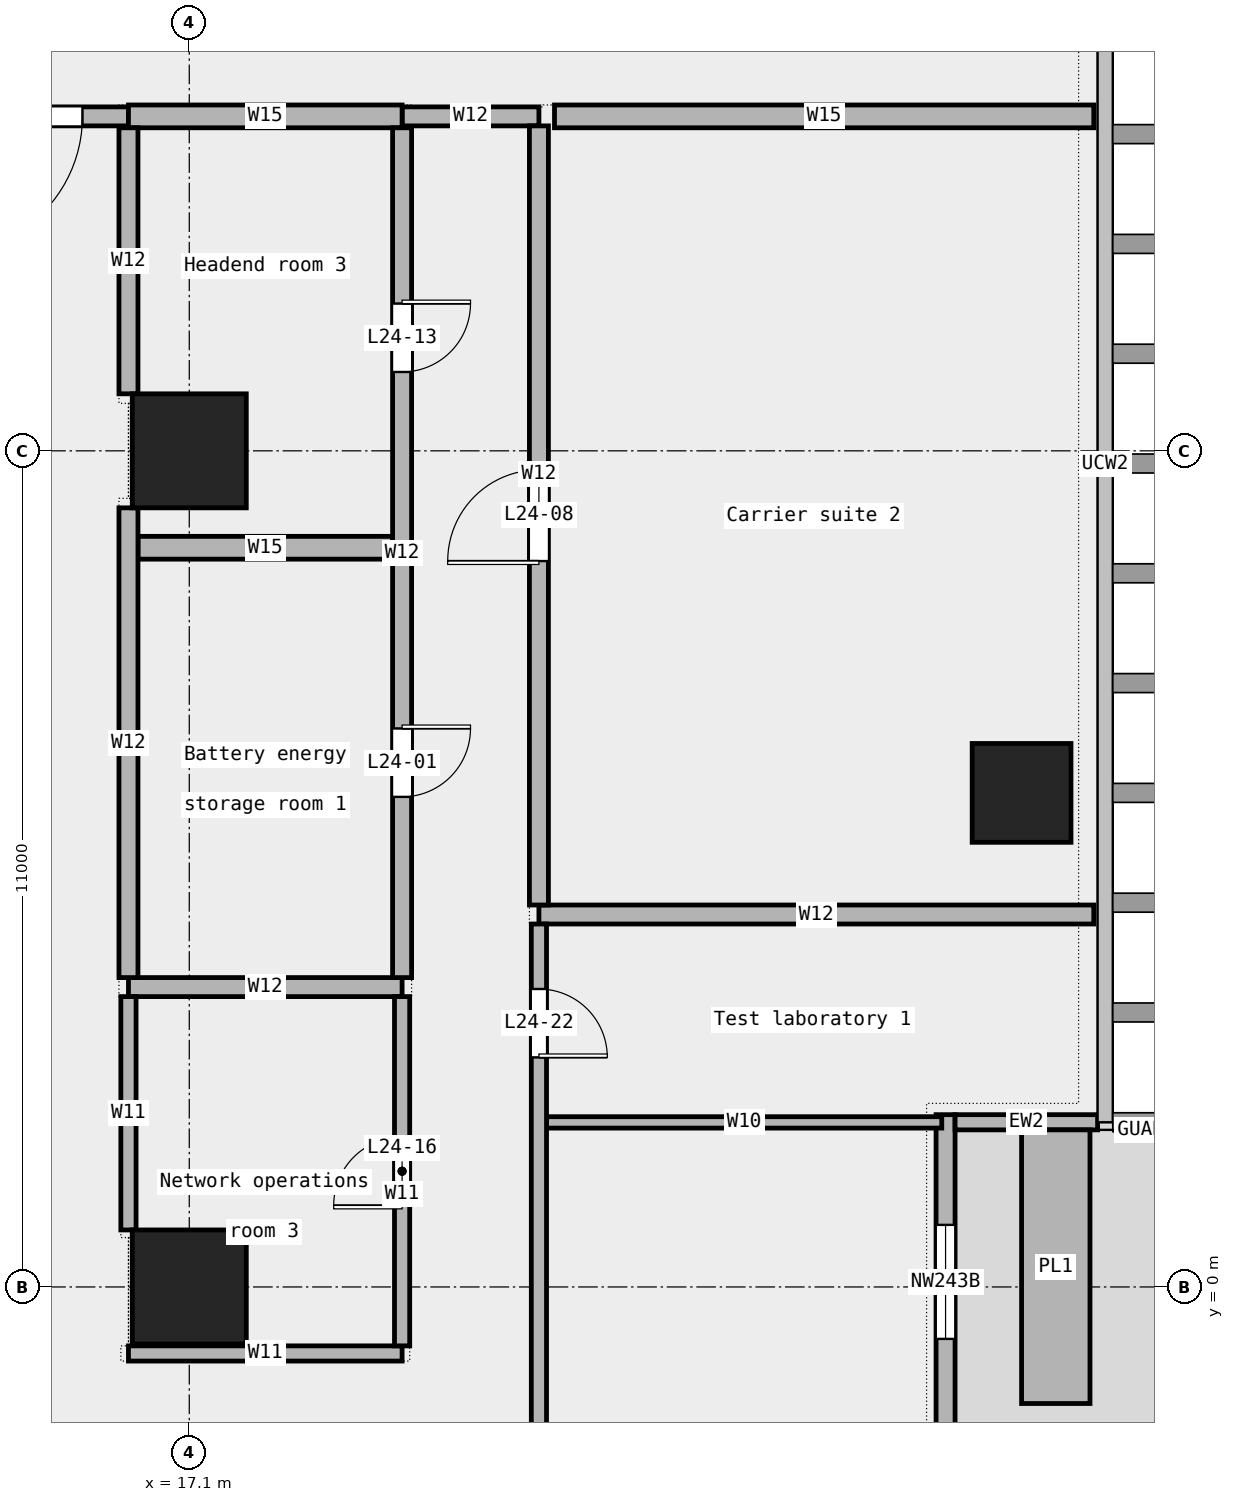
"""IFC4 building model, lengths in metres.
Left out: names, types, materials, properties, quantities, classifications, styles, units other than length and angle.
Written with IfcOpenShell. Run it as: python <this file> out.ifc"""

import sys

from ifc_helpers import new_model, si_unit, direction, frame, frame_2d, origin, origin_2d, place, context, subcontext, project, spatial, rectangle, extrude, element, fill, save


model = new_model("IFC4")
c1 = context("Model", 3, precision=1e-05, world=origin(), true_north=direction((0.0, 1.0)))
c2 = subcontext(c1, "Body", "Model", "MODEL_VIEW")
j1 = project(units=[si_unit("LENGTHUNIT", "METRE"), si_unit("PLANEANGLEUNIT", "RADIAN")], contexts=[c1])
p1 = place(None, origin())
s1 = spatial("IfcSite", under=j1, at=p1, CompositionType="ELEMENT")
p2 = place(p1, origin())
s2 = spatial("IfcBuilding", under=s1, at=p2, CompositionType="ELEMENT")
p3 = place(p2, frame((0.0, 0.0, 121.6)))
s3 = spatial("IfcBuildingStorey", under=s2, at=p3, CompositionType="ELEMENT", Elevation=121.6)
p4 = place(p3, frame((28.05, 6.5, 0.0), z_axis=(0.0, 0.0, 1.0), x_axis=(1.0, 0.0, 0.0)))
e1 = element("IfcColumn", 1, at=p4, inside=s3, PredefinedType="COLUMN", context=c2, shape_type="SweptSolid", body=[
    extrude(rectangle(XDim=1.3, YDim=1.3, at=origin_2d()), origin(), (0.0, 0.0, 1.0), 4.05),
])
for number, where, z_axis, x_axis in (
    (2, (17.1, 0.0, 0.0), (0.0, 0.0, 1.0), (1.0, 0.0, 0.0)),
    (3, (17.1, 11.0, 0.0), (0.0, 0.0, 1.0), (1.0, 0.0, 0.0)),
):
    element("IfcColumn", number, at=place(p3, frame(where, z_axis=z_axis, x_axis=x_axis)), inside=s3, PredefinedType="COLUMN", context=c2, shape_type="SweptSolid", body=[
        extrude(rectangle(XDim=1.5, YDim=1.5, at=origin_2d()), origin(), (0.0, 0.0, 1.0), 4.05),
    ])
p5 = place(p3, frame((27.05, -10.933, 0.0), z_axis=(0.0, 0.0, 1.0), x_axis=(0.0, 1.0, 0.0)))
e4 = element("IfcWall", 4, at=p5, inside=s3, PredefinedType="STANDARD", context=c2, shape_type="SweptSolid", body=[
    extrude(rectangle(XDim=13.2, YDim=0.25, at=frame_2d((6.6, 0.0))), origin(), (0.0, 0.0, 1.0), 4.05),
])
p6 = place(p5, frame((1.5, 0.0, 0.45)))
e5 = element("IfcOpeningElement", 5, at=p6, cuts=e4, PredefinedType="OPENING", context=c2, shape_type="SweptSolid", body=[
    extrude(rectangle(XDim=1.5, YDim=3.0, at=frame_2d((0.75, 1.5))), frame((0.0, 0.137, 0.0), z_axis=(0.0, -1.0, 0.0), x_axis=(1.0, 0.0, 0.0)), (0.0, 0.0, 1.0), 0.274),
])
p7 = place(p5, frame((5.75, 0.0, 0.0)))
e6 = element("IfcOpeningElement", 6, at=p7, cuts=e4, PredefinedType="OPENING", context=c2, shape_type="SweptSolid", body=[
    extrude(rectangle(XDim=1.8, YDim=2.4, at=frame_2d((0.9, 1.2))), frame((0.0, 0.137, 0.0), z_axis=(0.0, -1.0, 0.0), x_axis=(1.0, 0.0, 0.0)), (0.0, 0.0, 1.0), 0.274),
])
p8 = place(p5, frame((10.25, 0.0, 0.45)))
e7 = element("IfcOpeningElement", 7, at=p8, cuts=e4, PredefinedType="OPENING", context=c2, shape_type="SweptSolid", body=[
    extrude(rectangle(XDim=1.5, YDim=3.0, at=frame_2d((0.75, 1.5))), frame((0.0, 0.137, 0.0), z_axis=(0.0, -1.0, 0.0), x_axis=(1.0, 0.0, 0.0)), (0.0, 0.0, 1.0), 0.274),
])
p9 = place(p3, frame((29.05, 2.167, 0.0), z_axis=(0.0, 0.0, 1.0), x_axis=(-1.0, 0.0, 0.0)))
e8 = element("IfcWall", 8, at=p9, inside=s3, PredefinedType="STANDARD", context=c2, shape_type="SweptSolid", body=[
    extrude(rectangle(XDim=1.875, YDim=0.2, at=frame_2d((0.938, 0.0))), origin(), (0.0, 0.0, 1.0), 4.05),
])
p10 = place(p3, frame((28.5, -1.533, 0.0), z_axis=(0.0, 0.0, 1.0), x_axis=(0.0, 1.0, 0.0)))
e9 = element("IfcWall", 9, at=p10, inside=s3, PredefinedType="STANDARD", context=c2, shape_type="SweptSolid", body=[
    extrude(rectangle(XDim=3.6, YDim=0.9, at=frame_2d((1.8, 0.0))), origin(), (0.0, 0.0, 1.0), 0.7),
])
p11 = place(p3, frame((16.3, -0.875, 0.0), z_axis=(0.0, 0.0, 1.0), x_axis=(1.0, 0.0, 0.0)))
e10 = element("IfcWall", 10, at=p11, inside=s3, PredefinedType="PARTITIONING", context=c2, shape_type="SweptSolid", body=[
    extrude(rectangle(XDim=3.6, YDim=0.2, at=frame_2d((1.8, 0.0))), origin(), (0.0, 0.0, 1.0), 4.05),
])
p12 = place(p3, frame((21.8, 2.165, 0.0), z_axis=(0.0, 0.0, 1.0), x_axis=(1.0, 0.0, 0.0)))
e11 = element("IfcWall", 11, at=p12, inside=s3, PredefinedType="PARTITIONING", context=c2, shape_type="SweptSolid", body=[
    extrude(rectangle(XDim=5.2, YDim=0.15, at=frame_2d((2.6, 0.0))), origin(), (0.0, 0.0, 1.0), 4.05),
])
p13 = place(p3, frame((16.3, 3.945, 0.0), z_axis=(0.0, 0.0, 1.0), x_axis=(1.0, 0.0, 0.0)))
e12 = element("IfcWall", 12, at=p13, inside=s3, PredefinedType="PARTITIONING", context=c2, shape_type="SweptSolid", body=[
    extrude(rectangle(XDim=3.6, YDim=0.25, at=frame_2d((1.8, 0.0))), origin(), (0.0, 0.0, 1.0), 4.05),
])
p14 = place(p3, frame((21.7, 4.9, 0.0), z_axis=(0.0, 0.0, 1.0), x_axis=(1.0, 0.0, 0.0)))
e13 = element("IfcWall", 13, at=p14, inside=s3, PredefinedType="PARTITIONING", context=c2, shape_type="SweptSolid", body=[
    extrude(rectangle(XDim=7.3, YDim=0.25, at=frame_2d((3.65, 0.0))), origin(), (0.0, 0.0, 1.0), 4.05),
])
p15 = place(p3, frame((16.425, 9.725, 0.0), z_axis=(0.0, 0.0, 1.0), x_axis=(1.0, 0.0, 0.0)))
e14 = element("IfcWall", 14, at=p15, inside=s3, PredefinedType="PARTITIONING", context=c2, shape_type="SweptSolid", body=[
    extrude(rectangle(XDim=3.35, YDim=0.3, at=frame_2d((1.675, 0.0))), origin(), (0.0, 0.0, 1.0), 4.05),
])
p16 = place(p3, frame((13.29, 15.4, 0.0), z_axis=(0.0, 0.0, 1.0), x_axis=(1.0, 0.0, 0.0)))
e15 = element("IfcWall", 15, at=p16, inside=s3, PredefinedType="PARTITIONING", context=c2, shape_type="SweptSolid", body=[
    extrude(rectangle(XDim=3.01, YDim=0.25, at=frame_2d((1.505, 0.0))), origin(), (0.0, 0.0, 1.0), 4.05),
])
p17 = place(p16, frame((0.605, 0.0, 0.0)))
e16 = element("IfcOpeningElement", 16, at=p17, cuts=e15, PredefinedType="OPENING", context=c2, shape_type="SweptSolid", body=[
    extrude(rectangle(XDim=1.8, YDim=2.1, at=frame_2d((0.9, 1.05))), frame((0.0, 0.137, 0.0), z_axis=(0.0, -1.0, 0.0), x_axis=(1.0, 0.0, 0.0)), (0.0, 0.0, 1.0), 0.274),
])
p18 = place(p3, frame((19.9, 15.4, 0.0), z_axis=(0.0, 0.0, 1.0), x_axis=(1.0, 0.0, 0.0)))
e17 = element("IfcWall", 17, at=p18, inside=s3, PredefinedType="PARTITIONING", context=c2, shape_type="SweptSolid", body=[
    extrude(rectangle(XDim=1.8, YDim=0.25, at=frame_2d((0.9, 0.0))), origin(), (0.0, 0.0, 1.0), 4.05),
])
p19 = place(p3, frame((16.3, 15.4, 0.0), z_axis=(0.0, 0.0, 1.0), x_axis=(1.0, 0.0, 0.0)))
e18 = element("IfcWall", 18, at=p19, inside=s3, PredefinedType="PARTITIONING", context=c2, shape_type="SweptSolid", body=[
    extrude(rectangle(XDim=3.6, YDim=0.3, at=frame_2d((1.8, 0.0))), origin(), (0.0, 0.0, 1.0), 4.05),
])
p20 = place(p3, frame((21.905, 15.4, 0.0), z_axis=(0.0, 0.0, 1.0), x_axis=(1.0, 0.0, 0.0)))
e19 = element("IfcWall", 19, at=p20, inside=s3, PredefinedType="PARTITIONING", context=c2, shape_type="SweptSolid", body=[
    extrude(rectangle(XDim=7.095, YDim=0.3, at=frame_2d((3.547, 0.0))), origin(), (0.0, 0.0, 1.0), 4.05),
])
p21 = place(p3, frame((16.3, 0.75, 0.0), z_axis=(0.0, 0.0, 1.0), x_axis=(0.0, 1.0, 0.0)))
e20 = element("IfcWall", 20, at=p21, inside=s3, PredefinedType="PARTITIONING", context=c2, shape_type="SweptSolid", body=[
    extrude(rectangle(XDim=3.07, YDim=0.2, at=frame_2d((1.535, 0.0))), origin(), (0.0, 0.0, 1.0), 4.05),
])
p22 = place(p3, frame((16.3, 4.07, 0.0), z_axis=(0.0, 0.0, 1.0), x_axis=(0.0, 1.0, 0.0)))
e21 = element("IfcWall", 21, at=p22, inside=s3, PredefinedType="PARTITIONING", context=c2, shape_type="SweptSolid", body=[
    extrude(rectangle(XDim=6.18, YDim=0.25, at=frame_2d((3.09, 0.0))), origin(), (0.0, 0.0, 1.0), 4.05),
])
p23 = place(p3, frame((16.3, 11.75, 0.0), z_axis=(0.0, 0.0, 1.0), x_axis=(0.0, 1.0, 0.0)))
e22 = element("IfcWall", 22, at=p23, inside=s3, PredefinedType="PARTITIONING", context=c2, shape_type="SweptSolid", body=[
    extrude(rectangle(XDim=3.5, YDim=0.25, at=frame_2d((1.75, 0.0))), origin(), (0.0, 0.0, 1.0), 4.05),
])
p24 = place(p3, frame((19.9, -0.775, 0.0), z_axis=(0.0, 0.0, 1.0), x_axis=(0.0, 1.0, 0.0)))
e23 = element("IfcWall", 23, at=p24, inside=s3, PredefinedType="PARTITIONING", context=c2, shape_type="SweptSolid", body=[
    extrude(rectangle(XDim=4.595, YDim=0.2, at=frame_2d((2.297, 0.0))), origin(), (0.0, 0.0, 1.0), 4.05),
])
p25 = place(p24, frame((1.847, 0.0, 0.0)))
e24 = element("IfcOpeningElement", 24, at=p25, cuts=e23, PredefinedType="OPENING", context=c2, shape_type="SweptSolid", body=[
    extrude(rectangle(XDim=0.9, YDim=2.1, at=frame_2d((0.45, 1.05))), frame((0.0, 0.112, 0.0), z_axis=(0.0, -1.0, 0.0), x_axis=(1.0, 0.0, 0.0)), (0.0, 0.0, 1.0), 0.224),
])
p26 = place(p3, frame((19.9, 4.07, 0.0), z_axis=(0.0, 0.0, 1.0), x_axis=(0.0, 1.0, 0.0)))
e25 = element("IfcWall", 25, at=p26, inside=s3, PredefinedType="PARTITIONING", context=c2, shape_type="SweptSolid", body=[
    extrude(rectangle(XDim=11.18, YDim=0.25, at=frame_2d((5.59, 0.0))), origin(), (0.0, 0.0, 1.0), 4.05),
])
p27 = place(p26, frame((2.377, 0.0, 0.0)))
e26 = element("IfcOpeningElement", 26, at=p27, cuts=e25, PredefinedType="OPENING", context=c2, shape_type="SweptSolid", body=[
    extrude(rectangle(XDim=0.9, YDim=2.1, at=frame_2d((0.45, 1.05))), frame((0.0, 0.137, 0.0), z_axis=(0.0, -1.0, 0.0), x_axis=(1.0, 0.0, 0.0)), (0.0, 0.0, 1.0), 0.274),
])
p28 = place(p26, frame((7.968, 0.0, 0.0)))
e27 = element("IfcOpeningElement", 27, at=p28, cuts=e25, PredefinedType="OPENING", context=c2, shape_type="SweptSolid", body=[
    extrude(rectangle(XDim=0.9, YDim=2.1, at=frame_2d((0.45, 1.05))), frame((0.0, 0.137, 0.0), z_axis=(0.0, -1.0, 0.0), x_axis=(1.0, 0.0, 0.0)), (0.0, 0.0, 1.0), 0.274),
])
p29 = place(p3, frame((21.7, -9.0, 0.0), z_axis=(0.0, 0.0, 1.0), x_axis=(0.0, 1.0, 0.0)))
e28 = element("IfcWall", 28, at=p29, inside=s3, PredefinedType="PARTITIONING", context=c2, shape_type="SweptSolid", body=[
    extrude(rectangle(XDim=13.775, YDim=0.2, at=frame_2d((6.887, 0.0))), origin(), (0.0, 0.0, 1.0), 4.05),
])
p30 = place(p29, frame((4.833, 0.0, 0.0)))
e29 = element("IfcOpeningElement", 29, at=p30, cuts=e28, PredefinedType="OPENING", context=c2, shape_type="SweptSolid", body=[
    extrude(rectangle(XDim=1.5, YDim=2.1, at=frame_2d((0.75, 1.05))), frame((0.0, 0.112, 0.0), z_axis=(0.0, -1.0, 0.0), x_axis=(1.0, 0.0, 0.0)), (0.0, 0.0, 1.0), 0.224),
])
p31 = place(p29, frame((12.02, 0.0, 0.0)))
e30 = element("IfcOpeningElement", 30, at=p31, cuts=e28, PredefinedType="OPENING", context=c2, shape_type="SweptSolid", body=[
    extrude(rectangle(XDim=0.9, YDim=2.1, at=frame_2d((0.45, 1.05))), frame((0.0, 0.112, 0.0), z_axis=(0.0, -1.0, 0.0), x_axis=(1.0, 0.0, 0.0)), (0.0, 0.0, 1.0), 0.224),
])
p32 = place(p3, frame((21.7, 5.025, 0.0), z_axis=(0.0, 0.0, 1.0), x_axis=(0.0, 1.0, 0.0)))
e31 = element("IfcWall", 31, at=p32, inside=s3, PredefinedType="PARTITIONING", context=c2, shape_type="SweptSolid", body=[
    extrude(rectangle(XDim=10.25, YDim=0.25, at=frame_2d((5.125, 0.0))), origin(), (0.0, 0.0, 1.0), 4.05),
])
p33 = place(p32, frame((4.525, 0.0, 0.0)))
e32 = element("IfcOpeningElement", 32, at=p33, cuts=e31, PredefinedType="OPENING", context=c2, shape_type="SweptSolid", body=[
    extrude(rectangle(XDim=1.2, YDim=2.1, at=frame_2d((0.6, 1.05))), frame((0.0, 0.137, 0.0), z_axis=(0.0, -1.0, 0.0), x_axis=(1.0, 0.0, 0.0)), (0.0, 0.0, 1.0), 0.274),
])
p34 = place(p8, origin())
e33 = element("IfcWindow", 33, at=p34, inside=s3, PartitioningType="SINGLE_PANEL", PredefinedType="WINDOW", context=c2, shape_type="SweptSolid", body=[
    extrude(rectangle(XDim=1.5, YDim=3.0, at=frame_2d((0.75, 1.5))), frame((0.0, 0.03, 0.0), z_axis=(0.0, -1.0, 0.0), x_axis=(1.0, 0.0, 0.0)), (0.0, 0.0, 1.0), 0.06),
])
fill(e7, e33)
p35 = place(p27, origin())
e34 = element("IfcDoor", 34, at=p35, inside=s3, OperationType="SINGLE_SWING_LEFT", PredefinedType="DOOR", context=c2, shape_type="SweptSolid", body=[
    extrude(rectangle(XDim=0.9, YDim=2.1, at=frame_2d((0.45, 1.05))), frame((0.0, 0.025, 0.0), z_axis=(0.0, -1.0, 0.0), x_axis=(1.0, 0.0, 0.0)), (0.0, 0.0, 1.0), 0.05),
])
fill(e26, e34)
p36 = place(p33, origin())
e35 = element("IfcDoor", 35, at=p36, inside=s3, OperationType="SINGLE_SWING_LEFT", PredefinedType="DOOR", context=c2, shape_type="SweptSolid", body=[
    extrude(rectangle(XDim=1.2, YDim=2.1, at=frame_2d((0.6, 1.05))), frame((0.0, 0.025, 0.0), z_axis=(0.0, -1.0, 0.0), x_axis=(1.0, 0.0, 0.0)), (0.0, 0.0, 1.0), 0.05),
])
fill(e32, e35)
p37 = place(p28, origin())
e36 = element("IfcDoor", 36, at=p37, inside=s3, OperationType="SINGLE_SWING_LEFT", PredefinedType="DOOR", context=c2, shape_type="SweptSolid", body=[
    extrude(rectangle(XDim=0.9, YDim=2.1, at=frame_2d((0.45, 1.05))), frame((0.0, 0.025, 0.0), z_axis=(0.0, -1.0, 0.0), x_axis=(1.0, 0.0, 0.0)), (0.0, 0.0, 1.0), 0.05),
])
fill(e27, e36)
p38 = place(p25, origin())
e37 = element("IfcDoor", 37, at=p38, inside=s3, OperationType="SINGLE_SWING_LEFT", PredefinedType="DOOR", context=c2, shape_type="SweptSolid", body=[
    extrude(rectangle(XDim=0.9, YDim=2.1, at=frame_2d((0.45, 1.05))), frame((0.0, 0.025, 0.0), z_axis=(0.0, -1.0, 0.0), x_axis=(1.0, 0.0, 0.0)), (0.0, 0.0, 1.0), 0.05),
])
fill(e24, e37)
p39 = place(p17, origin())
e38 = element("IfcDoor", 38, at=p39, inside=s3, OperationType="DOUBLE_DOOR_SINGLE_SWING", PredefinedType="DOOR", context=c2, shape_type="SweptSolid", body=[
    extrude(rectangle(XDim=1.8, YDim=2.1, at=frame_2d((0.9, 1.05))), frame((0.0, 0.025, 0.0), z_axis=(0.0, -1.0, 0.0), x_axis=(1.0, 0.0, 0.0)), (0.0, 0.0, 1.0), 0.05),
])
fill(e16, e38)
p40 = place(p31, origin())
e39 = element("IfcDoor", 39, at=p40, inside=s3, OperationType="SINGLE_SWING_RIGHT", PredefinedType="DOOR", context=c2, shape_type="SweptSolid", body=[
    extrude(rectangle(XDim=0.9, YDim=2.1, at=frame_2d((0.45, 1.05))), frame((0.0, 0.025, 0.0), z_axis=(0.0, -1.0, 0.0), x_axis=(1.0, 0.0, 0.0)), (0.0, 0.0, 1.0), 0.05),
])
fill(e30, e39)
save(model, sys.argv[1])
